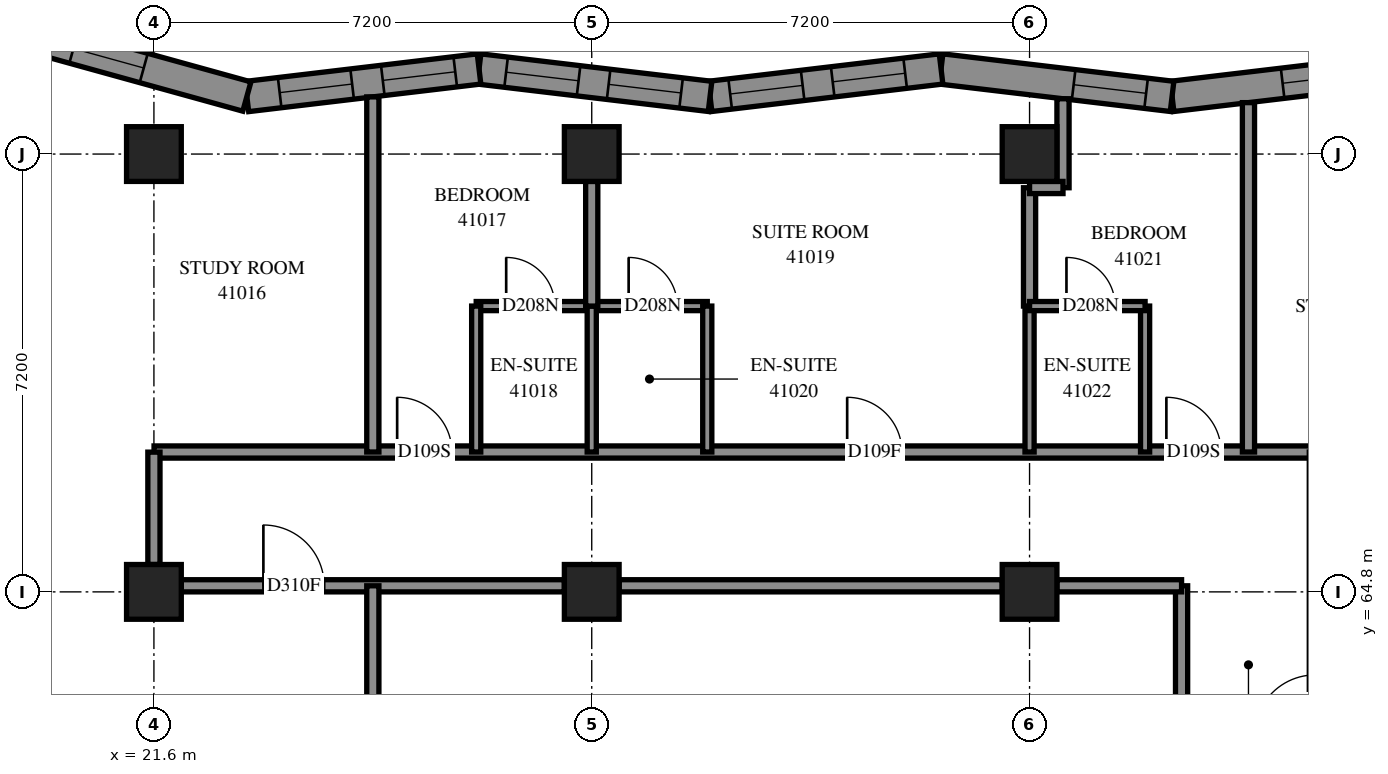
"""IFC4 building model, lengths in metres.
Left out: names, types, materials, properties, quantities, classifications, styles, units other than length and angle.
Written with IfcOpenShell. Run it as: python <this file> out.ifc"""

import sys

from ifc_helpers import new_model, si_unit, direction, frame, frame_2d, origin, origin_2d, place, context, subcontext, project, spatial, polyline, rectangle, outline, extrude, element, fill, save


model = new_model("IFC4")
c1 = context("Model", 3, precision=1e-05, world=origin(), true_north=direction((0.0, 1.0)))
c2 = subcontext(c1, "Body", "Model", "MODEL_VIEW")
j1 = project(units=[si_unit("LENGTHUNIT", "METRE"), si_unit("PLANEANGLEUNIT", "RADIAN")], contexts=[c1])
p1 = place(None, origin())
s1 = spatial("IfcSite", under=j1, at=p1, CompositionType="ELEMENT")
p2 = place(p1, origin())
s2 = spatial("IfcBuilding", under=s1, at=p2, CompositionType="ELEMENT")
p3 = place(p2, frame((0.0, 0.0, 152.4)))
s3 = spatial("IfcBuildingStorey", under=s2, at=p3, CompositionType="ELEMENT", Elevation=152.4)
for number, where, z_axis, x_axis in (
    (1, (21.6, 64.8, 0.0), (0.0, 0.0, 1.0), (1.0, 0.0, 0.0)),
    (2, (21.6, 72.0, 0.0), (0.0, 0.0, 1.0), (1.0, 0.0, 0.0)),
    (3, (28.8, 64.8, 0.0), (0.0, 0.0, 1.0), (1.0, 0.0, 0.0)),
    (4, (28.8, 72.0, 0.0), (0.0, 0.0, 1.0), (1.0, 0.0, 0.0)),
    (5, (36.0, 64.8, 0.0), (0.0, 0.0, 1.0), (1.0, 0.0, 0.0)),
    (6, (36.0, 72.0, 0.0), (0.0, 0.0, 1.0), (1.0, 0.0, 0.0)),
):
    element("IfcColumn", number, at=place(p3, frame(where, z_axis=z_axis, x_axis=x_axis)), inside=s3, PredefinedType="COLUMN", context=c2, shape_type="SweptSolid", body=[
        extrude(rectangle(XDim=0.9, YDim=0.9, at=origin_2d()), origin(), (0.0, 0.0, 1.0), 3.1),
    ])
p4 = place(p3, frame((42.143, 73.399, 0.0), z_axis=(0.0, 0.0, 1.0), x_axis=(-0.9930269402, -0.1178876415, 0.0)))
e7 = element("IfcWall", 7, at=p4, inside=s3, PredefinedType="SOLIDWALL", context=c2, shape_type="SweptSolid", body=[
    extrude(outline(polyline([(-0.03, -0.25), (3.796, -0.25), (3.855, 0.25), (0.03, 0.25), (-0.03, -0.25)])), origin(), (0.0, 0.0, 1.0), 3.1),
])
p5 = place(p4, frame((0.795, 0.0, 0.45)))
e8 = element("IfcOpeningElement", 8, at=p5, cuts=e7, PredefinedType="OPENING", context=c2, shape_type="SweptSolid", body=[
    extrude(rectangle(XDim=1.2, YDim=2.5, at=frame_2d((0.6, 1.25))), frame((0.0, 0.26, 0.0), z_axis=(0.0, -1.0, 0.0), x_axis=(1.0, 0.0, 0.0)), (0.0, 0.0, 1.0), 0.52),
])
p6 = place(p3, frame((38.344, 72.948, 0.0), z_axis=(0.0, 0.0, 1.0), x_axis=(-0.9930265769, 0.1178907016, 0.0)))
e9 = element("IfcWall", 9, at=p6, inside=s3, PredefinedType="SOLIDWALL", context=c2, shape_type="SweptSolid", body=[
    extrude(outline(polyline([(0.03, -0.25), (3.855, -0.25), (3.796, 0.25), (-0.03, 0.25), (0.03, -0.25)])), origin(), (0.0, 0.0, 1.0), 3.1),
])
p7 = place(p6, frame((0.43, 0.0, 0.45)))
e10 = element("IfcOpeningElement", 10, at=p7, cuts=e9, PredefinedType="OPENING", context=c2, shape_type="SweptSolid", body=[
    extrude(rectangle(XDim=1.2, YDim=2.5, at=frame_2d((0.6, 1.25))), frame((0.0, 0.26, 0.0), z_axis=(0.0, -1.0, 0.0), x_axis=(1.0, 0.0, 0.0)), (0.0, 0.0, 1.0), 0.52),
])
p8 = place(p3, frame((34.545, 73.399, 0.0), z_axis=(0.0, 0.0, 1.0), x_axis=(-0.9930269402, -0.1178876415, 0.0)))
e11 = element("IfcWall", 11, at=p8, inside=s3, PredefinedType="SOLIDWALL", context=c2, shape_type="SweptSolid", body=[
    extrude(outline(polyline([(-0.03, -0.25), (3.796, -0.25), (3.855, 0.25), (0.03, 0.25), (-0.03, -0.25)])), origin(), (0.0, 0.0, 1.0), 3.1),
])
p9 = place(p8, frame((0.595, 0.0, 0.45)))
e12 = element("IfcOpeningElement", 12, at=p9, cuts=e11, PredefinedType="OPENING", context=c2, shape_type="SweptSolid", body=[
    extrude(rectangle(XDim=1.2, YDim=2.5, at=frame_2d((0.6, 1.25))), frame((0.0, 0.26, 0.0), z_axis=(0.0, -1.0, 0.0), x_axis=(1.0, 0.0, 0.0)), (0.0, 0.0, 1.0), 0.52),
])
p10 = place(p8, frame((2.293, 0.0, 0.45)))
e13 = element("IfcOpeningElement", 13, at=p10, cuts=e11, PredefinedType="OPENING", context=c2, shape_type="SweptSolid", body=[
    extrude(rectangle(XDim=1.2, YDim=2.5, at=frame_2d((0.6, 1.25))), frame((0.0, 0.26, 0.0), z_axis=(0.0, -1.0, 0.0), x_axis=(1.0, 0.0, 0.0)), (0.0, 0.0, 1.0), 0.52),
])
p11 = place(p3, frame((30.746, 72.948, 0.0), z_axis=(0.0, 0.0, 1.0), x_axis=(-0.9930269402, 0.1178876415, 0.0)))
e14 = element("IfcWall", 14, at=p11, inside=s3, PredefinedType="SOLIDWALL", context=c2, shape_type="SweptSolid", body=[
    extrude(outline(polyline([(0.03, -0.25), (3.855, -0.25), (3.796, 0.25), (-0.03, 0.25), (0.03, -0.25)])), origin(), (0.0, 0.0, 1.0), 3.1),
])
p12 = place(p11, frame((0.48, 0.0, 0.45)))
e15 = element("IfcOpeningElement", 15, at=p12, cuts=e14, PredefinedType="OPENING", context=c2, shape_type="SweptSolid", body=[
    extrude(rectangle(XDim=1.2, YDim=2.5, at=frame_2d((0.6, 1.25))), frame((0.0, 0.26, 0.0), z_axis=(0.0, -1.0, 0.0), x_axis=(1.0, 0.0, 0.0)), (0.0, 0.0, 1.0), 0.52),
])
p13 = place(p11, frame((2.178, 0.0, 0.45)))
e16 = element("IfcOpeningElement", 16, at=p13, cuts=e14, PredefinedType="OPENING", context=c2, shape_type="SweptSolid", body=[
    extrude(rectangle(XDim=1.2, YDim=2.5, at=frame_2d((0.6, 1.25))), frame((0.0, 0.26, 0.0), z_axis=(0.0, -1.0, 0.0), x_axis=(1.0, 0.0, 0.0)), (0.0, 0.0, 1.0), 0.52),
])
p14 = place(p3, frame((26.947, 73.399, 0.0), z_axis=(0.0, 0.0, 1.0), x_axis=(-0.9930293555, -0.1178672945, 0.0)))
e17 = element("IfcWall", 17, at=p14, inside=s3, PredefinedType="SOLIDWALL", context=c2, shape_type="SweptSolid", body=[
    extrude(outline(polyline([(-0.03, -0.25), (3.796, -0.25), (3.894, 0.25), (0.03, 0.25), (-0.03, -0.25)])), origin(), (0.0, 0.0, 1.0), 3.1),
])
p15 = place(p14, frame((0.394, 0.0, 0.45)))
e18 = element("IfcOpeningElement", 18, at=p15, cuts=e17, PredefinedType="OPENING", context=c2, shape_type="SweptSolid", body=[
    extrude(rectangle(XDim=1.2, YDim=2.5, at=frame_2d((0.6, 1.25))), frame((0.0, 0.26, 0.0), z_axis=(0.0, -1.0, 0.0), x_axis=(1.0, 0.0, 0.0)), (0.0, 0.0, 1.0), 0.52),
])
p16 = place(p14, frame((2.102, 0.0, 0.45)))
e19 = element("IfcOpeningElement", 19, at=p16, cuts=e17, PredefinedType="OPENING", context=c2, shape_type="SweptSolid", body=[
    extrude(rectangle(XDim=1.2, YDim=2.5, at=frame_2d((0.6, 1.25))), frame((0.0, 0.26, 0.0), z_axis=(0.0, -1.0, 0.0), x_axis=(1.0, 0.0, 0.0)), (0.0, 0.0, 1.0), 0.52),
])
p17 = place(p3, frame((23.129, 72.946, 0.0), z_axis=(0.0, 0.0, 1.0), x_axis=(-0.9638041041, 0.2666114194, 0.0)))
e20 = element("IfcWall", 20, at=p17, inside=s3, PredefinedType="SOLIDWALL", context=c2, shape_type="SweptSolid", body=[
    extrude(outline(polyline([(0.049, -0.25), (3.991, -0.25), (3.334, 0.25), (-0.049, 0.25), (0.049, -0.25)])), origin(), (0.0, 0.0, 1.0), 3.1),
])
p18 = place(p17, frame((1.76, 0.0, 0.45)))
e21 = element("IfcOpeningElement", 21, at=p18, cuts=e20, PredefinedType="OPENING", context=c2, shape_type="SweptSolid", body=[
    extrude(rectangle(XDim=1.2, YDim=2.5, at=frame_2d((0.6, 1.25))), frame((0.0, 0.26, 0.0), z_axis=(0.0, -1.0, 0.0), x_axis=(1.0, 0.0, 0.0)), (0.0, 0.0, 1.0), 0.52),
])
p19 = place(p3, frame((21.602, 67.1, 0.0), z_axis=(0.0, 0.0, 1.0), x_axis=(1.0, 0.0, 0.0)))
e22 = element("IfcWall", 22, at=p19, inside=s3, PredefinedType="PARTITIONING", context=c2, shape_type="SweptSolid", body=[
    extrude(rectangle(XDim=19.098, YDim=0.2, at=frame_2d((9.549, 0.0))), origin(), (0.0, 0.0, 1.0), 3.1),
])
p20 = place(p19, frame((3.998, 0.0, 0.0)))
e23 = element("IfcOpeningElement", 23, at=p20, cuts=e22, PredefinedType="OPENING", context=c2, shape_type="SweptSolid", body=[
    extrude(rectangle(XDim=0.9, YDim=2.1, at=frame_2d((0.45, 1.05))), frame((0.0, 0.11, 0.0), z_axis=(0.0, -1.0, 0.0), x_axis=(1.0, 0.0, 0.0)), (0.0, 0.0, 1.0), 0.22),
])
p21 = place(p19, frame((11.399, 0.0, 0.0)))
e24 = element("IfcOpeningElement", 24, at=p21, cuts=e22, PredefinedType="OPENING", context=c2, shape_type="SweptSolid", body=[
    extrude(rectangle(XDim=0.9, YDim=2.1, at=frame_2d((0.45, 1.05))), frame((0.0, 0.11, 0.0), z_axis=(0.0, -1.0, 0.0), x_axis=(1.0, 0.0, 0.0)), (0.0, 0.0, 1.0), 0.22),
])
p22 = place(p19, frame((16.648, 0.0, 0.0)))
e25 = element("IfcOpeningElement", 25, at=p22, cuts=e22, PredefinedType="OPENING", context=c2, shape_type="SweptSolid", body=[
    extrude(rectangle(XDim=0.9, YDim=2.1, at=frame_2d((0.45, 1.05))), frame((0.0, 0.11, 0.0), z_axis=(0.0, -1.0, 0.0), x_axis=(1.0, 0.0, 0.0)), (0.0, 0.0, 1.0), 0.22),
])
p23 = place(p3, frame((22.05, 64.9, 0.0), z_axis=(0.0, 0.0, 1.0), x_axis=(1.0, 0.0, 0.0)))
e26 = element("IfcWall", 26, at=p23, inside=s3, PredefinedType="PARTITIONING", context=c2, shape_type="SweptSolid", body=[
    extrude(rectangle(XDim=6.3, YDim=0.2, at=frame_2d((3.15, 0.0))), origin(), (0.0, 0.0, 1.0), 2.6),
])
p24 = place(p23, frame((1.35, 0.0, 0.0)))
e27 = element("IfcOpeningElement", 27, at=p24, cuts=e26, PredefinedType="OPENING", context=c2, shape_type="SweptSolid", body=[
    extrude(rectangle(XDim=1.0, YDim=2.1, at=frame_2d((0.5, 1.05))), frame((0.0, 0.11, 0.0), z_axis=(0.0, -1.0, 0.0), x_axis=(1.0, 0.0, 0.0)), (0.0, 0.0, 1.0), 0.22),
])
p25 = place(p3, frame((29.25, 64.9, 0.0), z_axis=(0.0, 0.0, 1.0), x_axis=(1.0, 0.0, 0.0)))
e28 = element("IfcWall", 28, at=p25, inside=s3, PredefinedType="PARTITIONING", context=c2, shape_type="SweptSolid", body=[
    extrude(rectangle(XDim=6.3, YDim=0.2, at=frame_2d((3.15, 0.0))), origin(), (0.0, 0.0, 1.0), 2.6),
])
p26 = place(p3, frame((25.2, 67.1, 0.0), z_axis=(0.0, 0.0, 1.0), x_axis=(0.0, 1.0, 0.0)))
e29 = element("IfcWall", 29, at=p26, inside=s3, PredefinedType="PARTITIONING", context=c2, shape_type="SweptSolid", body=[
    extrude(rectangle(XDim=5.84, YDim=0.2, at=frame_2d((2.92, 0.0))), origin(), (0.0, 0.0, 1.0), 3.1),
])
p27 = place(p3, frame((39.6, 67.1, 0.0), z_axis=(0.0, 0.0, 1.0), x_axis=(0.0, 1.0, 0.0)))
e30 = element("IfcWall", 30, at=p27, inside=s3, PredefinedType="PARTITIONING", context=c2, shape_type="SweptSolid", body=[
    extrude(rectangle(XDim=5.746, YDim=0.2, at=frame_2d((2.873, 0.0))), origin(), (0.0, 0.0, 1.0), 3.1),
])
p28 = place(p3, frame((26.9, 69.5, 0.0), z_axis=(0.0, 0.0, 1.0), x_axis=(1.0, 0.0, 0.0)))
e31 = element("IfcWall", 31, at=p28, inside=s3, PredefinedType="PARTITIONING", context=c2, shape_type="SweptSolid", body=[
    extrude(rectangle(XDim=3.8, YDim=0.15, at=frame_2d((1.9, 0.0))), origin(), (0.0, 0.0, 1.0), 3.1),
])
p29 = place(p28, frame((0.493, 0.0, 0.0)))
e32 = element("IfcOpeningElement", 32, at=p29, cuts=e31, PredefinedType="OPENING", context=c2, shape_type="SweptSolid", body=[
    extrude(rectangle(XDim=0.8, YDim=2.1, at=frame_2d((0.4, 1.05))), frame((0.0, 0.085, 0.0), z_axis=(0.0, -1.0, 0.0), x_axis=(1.0, 0.0, 0.0)), (0.0, 0.0, 1.0), 0.17),
])
p30 = place(p28, frame((2.507, 0.0, 0.0)))
e33 = element("IfcOpeningElement", 33, at=p30, cuts=e31, PredefinedType="OPENING", context=c2, shape_type="SweptSolid", body=[
    extrude(rectangle(XDim=0.8, YDim=2.1, at=frame_2d((0.4, 1.05))), frame((0.0, 0.085, 0.0), z_axis=(0.0, -1.0, 0.0), x_axis=(1.0, 0.0, 0.0)), (0.0, 0.0, 1.0), 0.17),
])
p31 = place(p3, frame((38.5, 62.302, 0.0), z_axis=(0.0, 0.0, 1.0), x_axis=(0.0, 1.0, 0.0)))
e34 = element("IfcWall", 34, at=p31, inside=s3, PredefinedType="PARTITIONING", context=c2, shape_type="SweptSolid", body=[
    extrude(rectangle(XDim=2.598, YDim=0.2, at=frame_2d((1.299, 0.0))), origin(), (0.0, 0.0, 1.0), 3.1),
])
for number, where, z_axis, x_axis in (
    (35, (26.9, 67.1, 0.0), (0.0, 0.0, 1.0), (0.0, 1.0, 0.0)),
    (36, (28.8, 67.1, 0.0), (0.0, 0.0, 1.0), (0.0, 1.0, 0.0)),
    (37, (30.7, 67.1, 0.0), (0.0, 0.0, 1.0), (0.0, 1.0, 0.0)),
    (38, (36.0, 67.1, 0.0), (0.0, 0.0, 1.0), (0.0, 1.0, 0.0)),
    (39, (37.9, 67.1, 0.0), (0.0, 0.0, 1.0), (0.0, 1.0, 0.0)),
):
    element("IfcWall", number, at=place(p3, frame(where, z_axis=z_axis, x_axis=x_axis)), inside=s3, PredefinedType="PARTITIONING", context=c2, shape_type="SweptSolid", body=[
        extrude(rectangle(XDim=2.4, YDim=0.15, at=frame_2d((1.2, 0.0))), origin(), (0.0, 0.0, 1.0), 3.1),
    ])
for number, where, z_axis, x_axis in (
    (40, (36.45, 64.9, 0.0), (0.0, 0.0, 1.0), (1.0, 0.0, 0.0)),
    (41, (28.8, 69.5, 0.0), (0.0, 0.0, 1.0), (0.0, 1.0, 0.0)),
):
    element("IfcWall", number, at=place(p3, frame(where, z_axis=z_axis, x_axis=x_axis)), inside=s3, PredefinedType="PARTITIONING", context=c2, shape_type="SweptSolid", body=[
        extrude(rectangle(XDim=2.05, YDim=0.2, at=frame_2d((1.025, 0.0))), origin(), (0.0, 0.0, 1.0), 3.1),
    ])
p32 = place(p3, frame((36.0, 69.5, 0.0), z_axis=(0.0, 0.0, 1.0), x_axis=(0.0, 1.0, 0.0)))
e42 = element("IfcWall", 42, at=p32, inside=s3, PredefinedType="PARTITIONING", context=c2, shape_type="SweptSolid", body=[
    extrude(rectangle(XDim=1.946, YDim=0.2, at=frame_2d((0.973, 0.0))), origin(), (0.0, 0.0, 1.0), 3.1),
])
p33 = place(p3, frame((36.0, 69.5, 0.0), z_axis=(0.0, 0.0, 1.0), x_axis=(1.0, 0.0, 0.0)))
e43 = element("IfcWall", 43, at=p33, inside=s3, PredefinedType="PARTITIONING", context=c2, shape_type="SweptSolid", body=[
    extrude(rectangle(XDim=1.9, YDim=0.15, at=frame_2d((0.95, 0.0))), origin(), (0.0, 0.0, 1.0), 3.1),
])
p34 = place(p33, frame((0.607, 0.0, 0.0)))
e44 = element("IfcOpeningElement", 44, at=p34, cuts=e43, PredefinedType="OPENING", context=c2, shape_type="SweptSolid", body=[
    extrude(rectangle(XDim=0.8, YDim=2.1, at=frame_2d((0.4, 1.05))), frame((0.0, 0.085, 0.0), z_axis=(0.0, -1.0, 0.0), x_axis=(1.0, 0.0, 0.0)), (0.0, 0.0, 1.0), 0.17),
])
p35 = place(p3, frame((21.6, 65.25, 0.0), z_axis=(0.0, 0.0, 1.0), x_axis=(0.0, 1.0, 0.0)))
e45 = element("IfcWall", 45, at=p35, inside=s3, PredefinedType="PARTITIONING", context=c2, shape_type="SweptSolid", body=[
    extrude(rectangle(XDim=1.848, YDim=0.2, at=frame_2d((0.924, 0.0))), origin(), (0.0, 0.0, 1.0), 2.6),
])
p36 = place(p3, frame((25.2, 63.049, 0.0), z_axis=(0.0, 0.0, 1.0), x_axis=(0.0, 1.0, 0.0)))
e46 = element("IfcWall", 46, at=p36, inside=s3, PredefinedType="PARTITIONING", context=c2, shape_type="SweptSolid", body=[
    extrude(rectangle(XDim=1.851, YDim=0.2, at=frame_2d((0.925, 0.0))), origin(), (0.0, 0.0, 1.0), 3.1),
])
p37 = place(p3, frame((36.55, 71.446, 0.0), z_axis=(0.0, 0.0, 1.0), x_axis=(0.0, 1.0, 0.0)))
e47 = element("IfcWall", 47, at=p37, inside=s3, PredefinedType="PARTITIONING", context=c2, shape_type="SweptSolid", body=[
    extrude(rectangle(XDim=1.463, YDim=0.2, at=frame_2d((0.732, 0.0))), origin(), (0.0, 0.0, 1.0), 3.1),
])
p38 = place(p3, frame((36.0, 71.45, 0.0), z_axis=(0.0, 0.0, 1.0), x_axis=(1.0, 0.0, 0.0)))
e48 = element("IfcWall", 48, at=p38, inside=s3, PredefinedType="PARTITIONING", context=c2, shape_type="SweptSolid", body=[
    extrude(rectangle(XDim=0.55, YDim=0.2, at=frame_2d((0.275, 0.0))), origin(), (0.0, 0.0, 1.0), 3.1),
])
p39 = place(p5, origin())
e49 = element("IfcWindow", 49, at=p39, inside=s3, PartitioningType="SINGLE_PANEL", PredefinedType="WINDOW", context=c2, shape_type="SweptSolid", body=[
    extrude(rectangle(XDim=1.2, YDim=2.5, at=frame_2d((0.6, 1.25))), frame((0.0, 0.18, 0.0), z_axis=(0.0, -1.0, 0.0), x_axis=(1.0, 0.0, 0.0)), (0.0, 0.0, 1.0), 0.06),
])
fill(e8, e49)
p40 = place(p7, origin())
e50 = element("IfcWindow", 50, at=p40, inside=s3, PartitioningType="SINGLE_PANEL", PredefinedType="WINDOW", context=c2, shape_type="SweptSolid", body=[
    extrude(rectangle(XDim=1.2, YDim=2.5, at=frame_2d((0.6, 1.25))), frame((0.0, 0.18, 0.0), z_axis=(0.0, -1.0, 0.0), x_axis=(1.0, 0.0, 0.0)), (0.0, 0.0, 1.0), 0.06),
])
fill(e10, e50)
p41 = place(p9, origin())
e51 = element("IfcWindow", 51, at=p41, inside=s3, PartitioningType="SINGLE_PANEL", PredefinedType="WINDOW", context=c2, shape_type="SweptSolid", body=[
    extrude(rectangle(XDim=1.2, YDim=2.5, at=frame_2d((0.6, 1.25))), frame((0.0, 0.18, 0.0), z_axis=(0.0, -1.0, 0.0), x_axis=(1.0, 0.0, 0.0)), (0.0, 0.0, 1.0), 0.06),
])
fill(e12, e51)
p42 = place(p10, origin())
e52 = element("IfcWindow", 52, at=p42, inside=s3, PartitioningType="SINGLE_PANEL", PredefinedType="WINDOW", context=c2, shape_type="SweptSolid", body=[
    extrude(rectangle(XDim=1.2, YDim=2.5, at=frame_2d((0.6, 1.25))), frame((0.0, 0.18, 0.0), z_axis=(0.0, -1.0, 0.0), x_axis=(1.0, 0.0, 0.0)), (0.0, 0.0, 1.0), 0.06),
])
fill(e13, e52)
p43 = place(p12, origin())
e53 = element("IfcWindow", 53, at=p43, inside=s3, PartitioningType="SINGLE_PANEL", PredefinedType="WINDOW", context=c2, shape_type="SweptSolid", body=[
    extrude(rectangle(XDim=1.2, YDim=2.5, at=frame_2d((0.6, 1.25))), frame((0.0, 0.18, 0.0), z_axis=(0.0, -1.0, 0.0), x_axis=(1.0, 0.0, 0.0)), (0.0, 0.0, 1.0), 0.06),
])
fill(e15, e53)
p44 = place(p13, origin())
e54 = element("IfcWindow", 54, at=p44, inside=s3, PartitioningType="SINGLE_PANEL", PredefinedType="WINDOW", context=c2, shape_type="SweptSolid", body=[
    extrude(rectangle(XDim=1.2, YDim=2.5, at=frame_2d((0.6, 1.25))), frame((0.0, 0.18, 0.0), z_axis=(0.0, -1.0, 0.0), x_axis=(1.0, 0.0, 0.0)), (0.0, 0.0, 1.0), 0.06),
])
fill(e16, e54)
p45 = place(p15, origin())
e55 = element("IfcWindow", 55, at=p45, inside=s3, PartitioningType="SINGLE_PANEL", PredefinedType="WINDOW", context=c2, shape_type="SweptSolid", body=[
    extrude(rectangle(XDim=1.2, YDim=2.5, at=frame_2d((0.6, 1.25))), frame((0.0, 0.18, 0.0), z_axis=(0.0, -1.0, 0.0), x_axis=(1.0, 0.0, 0.0)), (0.0, 0.0, 1.0), 0.06),
])
fill(e18, e55)
p46 = place(p16, origin())
e56 = element("IfcWindow", 56, at=p46, inside=s3, PartitioningType="SINGLE_PANEL", PredefinedType="WINDOW", context=c2, shape_type="SweptSolid", body=[
    extrude(rectangle(XDim=1.2, YDim=2.5, at=frame_2d((0.6, 1.25))), frame((0.0, 0.18, 0.0), z_axis=(0.0, -1.0, 0.0), x_axis=(1.0, 0.0, 0.0)), (0.0, 0.0, 1.0), 0.06),
])
fill(e19, e56)
p47 = place(p18, origin())
e57 = element("IfcWindow", 57, at=p47, inside=s3, PartitioningType="SINGLE_PANEL", PredefinedType="WINDOW", context=c2, shape_type="SweptSolid", body=[
    extrude(rectangle(XDim=1.2, YDim=2.5, at=frame_2d((0.6, 1.25))), frame((0.0, 0.18, 0.0), z_axis=(0.0, -1.0, 0.0), x_axis=(1.0, 0.0, 0.0)), (0.0, 0.0, 1.0), 0.06),
])
fill(e21, e57)
p48 = place(p24, origin())
e58 = element("IfcDoor", 58, at=p48, inside=s3, OperationType="SINGLE_SWING_RIGHT", PredefinedType="DOOR", context=c2, shape_type="SweptSolid", body=[
    extrude(rectangle(XDim=1.0, YDim=2.1, at=frame_2d((0.5, 1.05))), frame((0.0, 0.025, 0.0), z_axis=(0.0, -1.0, 0.0), x_axis=(1.0, 0.0, 0.0)), (0.0, 0.0, 1.0), 0.05),
])
fill(e27, e58)
p49 = place(p20, origin())
e59 = element("IfcDoor", 59, at=p49, inside=s3, OperationType="SINGLE_SWING_LEFT", PredefinedType="DOOR", context=c2, shape_type="SweptSolid", body=[
    extrude(rectangle(XDim=0.9, YDim=2.1, at=frame_2d((0.45, 1.05))), frame((0.0, 0.025, 0.0), z_axis=(0.0, -1.0, 0.0), x_axis=(1.0, 0.0, 0.0)), (0.0, 0.0, 1.0), 0.05),
])
fill(e23, e59)
p50 = place(p29, origin())
e60 = element("IfcDoor", 60, at=p50, inside=s3, OperationType="SINGLE_SWING_RIGHT", PredefinedType="DOOR", context=c2, shape_type="SweptSolid", body=[
    extrude(rectangle(XDim=0.8, YDim=2.1, at=frame_2d((0.4, 1.05))), frame((0.0, 0.025, 0.0), z_axis=(0.0, -1.0, 0.0), x_axis=(1.0, 0.0, 0.0)), (0.0, 0.0, 1.0), 0.05),
])
fill(e32, e60)
p51 = place(p21, origin())
e61 = element("IfcDoor", 61, at=p51, inside=s3, OperationType="SINGLE_SWING_RIGHT", PredefinedType="DOOR", context=c2, shape_type="SweptSolid", body=[
    extrude(rectangle(XDim=0.9, YDim=2.1, at=frame_2d((0.45, 1.05))), frame((0.0, 0.025, 0.0), z_axis=(0.0, -1.0, 0.0), x_axis=(1.0, 0.0, 0.0)), (0.0, 0.0, 1.0), 0.05),
])
fill(e24, e61)
p52 = place(p30, origin())
e62 = element("IfcDoor", 62, at=p52, inside=s3, OperationType="SINGLE_SWING_RIGHT", PredefinedType="DOOR", context=c2, shape_type="SweptSolid", body=[
    extrude(rectangle(XDim=0.8, YDim=2.1, at=frame_2d((0.4, 1.05))), frame((0.0, 0.025, 0.0), z_axis=(0.0, -1.0, 0.0), x_axis=(1.0, 0.0, 0.0)), (0.0, 0.0, 1.0), 0.05),
])
fill(e33, e62)
p53 = place(p22, origin())
e63 = element("IfcDoor", 63, at=p53, inside=s3, OperationType="SINGLE_SWING_RIGHT", PredefinedType="DOOR", context=c2, shape_type="SweptSolid", body=[
    extrude(rectangle(XDim=0.9, YDim=2.1, at=frame_2d((0.45, 1.05))), frame((0.0, 0.025, 0.0), z_axis=(0.0, -1.0, 0.0), x_axis=(1.0, 0.0, 0.0)), (0.0, 0.0, 1.0), 0.05),
])
fill(e25, e63)
p54 = place(p34, origin())
e64 = element("IfcDoor", 64, at=p54, inside=s3, OperationType="SINGLE_SWING_RIGHT", PredefinedType="DOOR", context=c2, shape_type="SweptSolid", body=[
    extrude(rectangle(XDim=0.8, YDim=2.1, at=frame_2d((0.4, 1.05))), frame((0.0, 0.025, 0.0), z_axis=(0.0, -1.0, 0.0), x_axis=(1.0, 0.0, 0.0)), (0.0, 0.0, 1.0), 0.05),
])
fill(e44, e64)
save(model, sys.argv[1])
